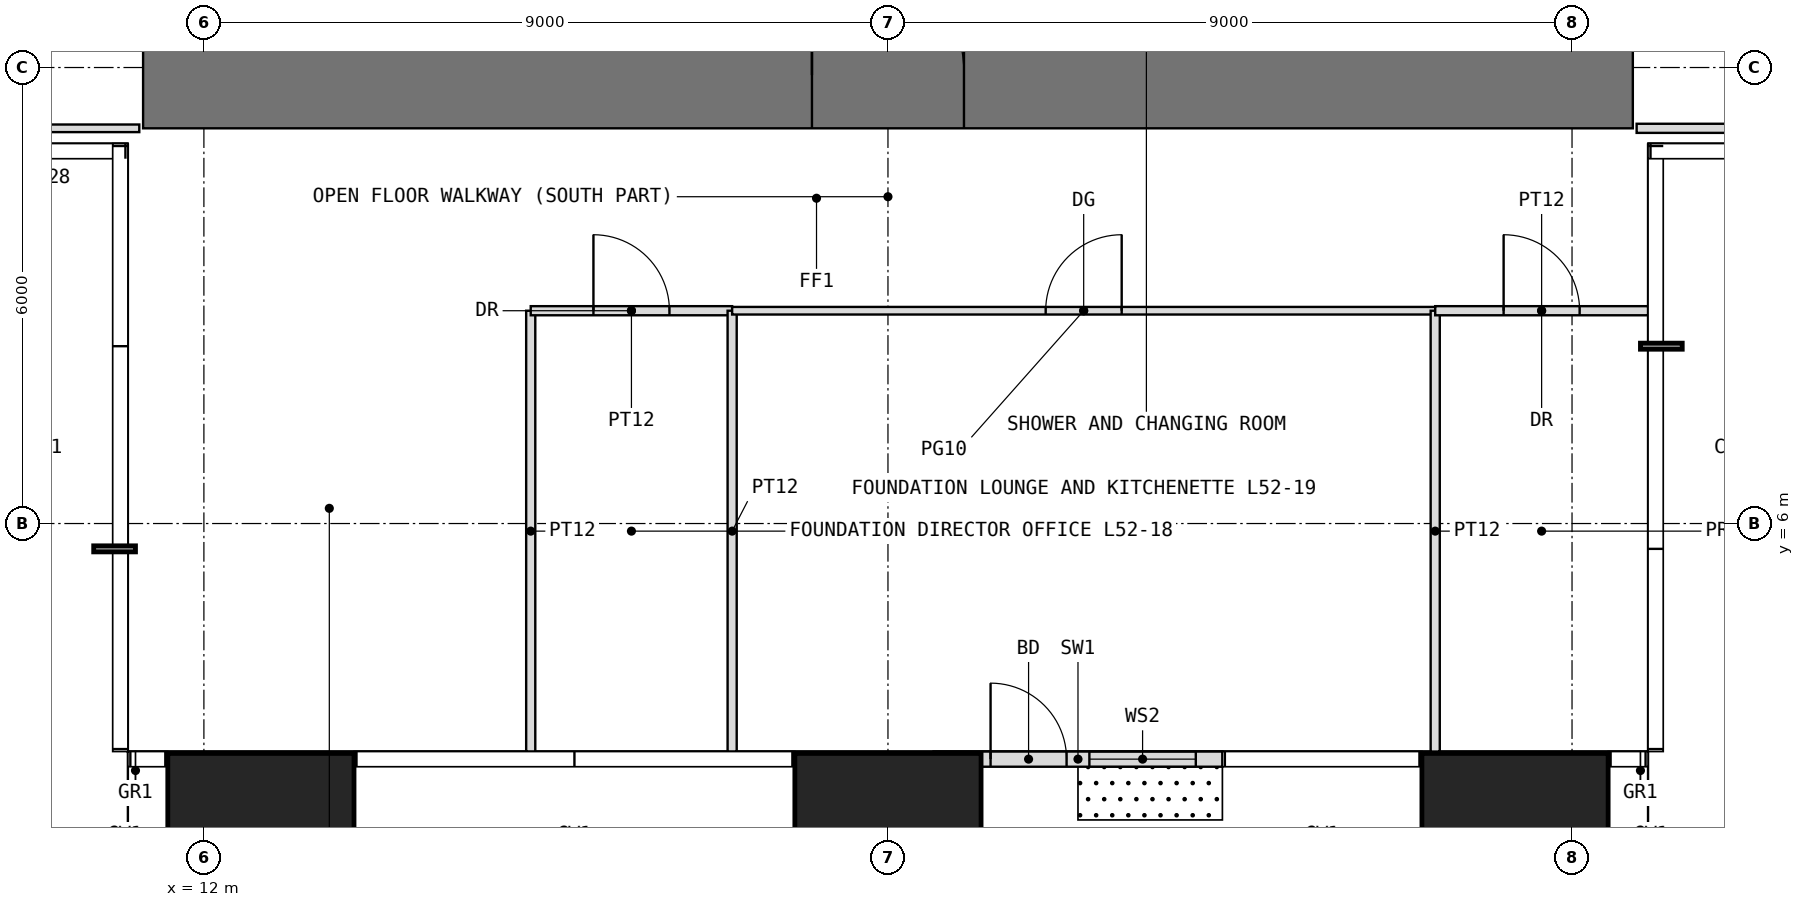
"""IFC4 building model, lengths in metres.
Left out: names, types, materials, properties, quantities, classifications, styles, units other than length and angle.
Written with IfcOpenShell. Run it as: python <this file> out.ifc"""

import sys

from ifc_helpers import new_model, si_unit, direction, frame, frame_2d, origin, origin_2d, place, context, subcontext, project, spatial, rectangle, extrude, element, fill, save


model = new_model("IFC4")
c1 = context("Model", 3, precision=1e-05, world=origin(), true_north=direction((0.0, 1.0)))
c2 = subcontext(c1, "Body", "Model", "MODEL_VIEW")
j1 = project(units=[si_unit("LENGTHUNIT", "METRE"), si_unit("PLANEANGLEUNIT", "RADIAN")], contexts=[c1])
p1 = place(None, origin())
s1 = spatial("IfcSite", under=j1, at=p1, CompositionType="ELEMENT")
p2 = place(p1, origin())
s2 = spatial("IfcBuilding", under=s1, at=p2, CompositionType="ELEMENT")
p3 = place(p2, frame((0.0, 0.0, 218.5)))
s3 = spatial("IfcBuildingStorey", under=s2, at=p3, CompositionType="ELEMENT", Elevation=218.5)
for number, where, z_axis, x_axis in (
    (1, (12.75, 1.75, 0.0), (0.0, 0.0, 1.0), (1.0, 0.0, 0.0)),
    (2, (21.0, 1.75, 0.0), (0.0, 0.0, 1.0), (1.0, 0.0, 0.0)),
    (3, (29.25, 1.75, 0.0), (0.0, 0.0, 1.0), (1.0, 0.0, 0.0)),
):
    element("IfcColumn", number, at=place(p3, frame(where, z_axis=z_axis, x_axis=x_axis)), inside=s3, PredefinedType="COLUMN", context=c2, shape_type="SweptSolid", body=[
        extrude(rectangle(XDim=2.45, YDim=2.45, at=origin_2d()), origin(), (0.0, 0.0, 1.0), 4.0),
    ])
p4 = place(p3, frame((21.6, 2.9, 0.0), z_axis=(0.0, 0.0, 1.0), x_axis=(1.0, 0.0, 0.0)))
e4 = element("IfcWall", 4, at=p4, inside=s3, PredefinedType="USERDEFINED", context=c2, shape_type="SweptSolid", body=[
    extrude(rectangle(XDim=3.8, YDim=0.2, at=frame_2d((1.9, 0.0))), origin(), (0.0, 0.0, 1.0), 3.75),
])
p5 = place(p4, frame((0.75, 0.0, 0.0)))
e5 = element("IfcOpeningElement", 5, at=p5, cuts=e4, PredefinedType="OPENING", context=c2, shape_type="SweptSolid", body=[
    extrude(rectangle(XDim=1.0, YDim=2.4, at=frame_2d((0.5, 1.2))), frame((0.0, 0.11, 0.0), z_axis=(0.0, -1.0, 0.0), x_axis=(1.0, 0.0, 0.0)), (0.0, 0.0, 1.0), 0.22),
])
p6 = place(p4, frame((2.05, 0.0, 0.3)))
e6 = element("IfcOpeningElement", 6, at=p6, cuts=e4, PredefinedType="OPENING", context=c2, shape_type="SweptSolid", body=[
    extrude(rectangle(XDim=1.4, YDim=2.7, at=frame_2d((0.7, 1.35))), frame((0.0, 0.11, 0.0), z_axis=(0.0, -1.0, 0.0), x_axis=(1.0, 0.0, 0.0)), (0.0, 0.0, 1.0), 0.22),
])
p7 = place(p3, frame((11.2, 11.9, -0.05), z_axis=(0.0, 0.0, 1.0), x_axis=(1.0, 0.0, 0.0)))
e7 = element("IfcWall", 7, at=p7, inside=s3, PredefinedType="SHEAR", context=c2, shape_type="SweptSolid", body=[
    extrude(rectangle(XDim=19.6, YDim=1.4, at=frame_2d((9.8, 0.0))), origin(), (0.0, 0.0, 1.0), 4.0),
])
p8 = place(p7, frame((8.8, 0.0, 0.05)))
e8 = element("IfcOpeningElement", 8, at=p8, cuts=e7, PredefinedType="OPENING", context=c2, shape_type="SweptSolid", body=[
    extrude(rectangle(XDim=2.0, YDim=2.2, at=frame_2d((1.0, 1.1))), frame((0.0, 0.71, 0.0), z_axis=(0.0, -1.0, 0.0), x_axis=(1.0, 0.0, 0.0)), (0.0, 0.0, 1.0), 1.42),
])
p9 = place(p3, frame((7.6, 11.2, 0.0), z_axis=(0.0, 0.0, 1.0), x_axis=(1.0, 0.0, 0.0)))
e9 = element("IfcWall", 9, at=p9, inside=s3, PredefinedType="PARTITIONING", context=c2, shape_type="SweptSolid", body=[
    extrude(rectangle(XDim=3.55, YDim=0.1, at=frame_2d((1.775, 0.0))), origin(), (0.0, 0.0, 1.0), 3.75),
])
p10 = place(p3, frame((16.3, 3.0, 0.0), z_axis=(0.0, 0.0, 1.0), x_axis=(0.0, 1.0, 0.0)))
e10 = element("IfcWall", 10, at=p10, inside=s3, PredefinedType="PARTITIONING", context=c2, shape_type="SweptSolid", body=[
    extrude(rectangle(XDim=5.8, YDim=0.12, at=frame_2d((2.9, 0.0))), origin(), (0.0, 0.0, 1.0), 3.75),
])
p11 = place(p3, frame((16.3, 8.8, 0.0), z_axis=(0.0, 0.0, 1.0), x_axis=(1.0, 0.0, 0.0)))
e11 = element("IfcWall", 11, at=p11, inside=s3, PredefinedType="PARTITIONING", context=c2, shape_type="SweptSolid", body=[
    extrude(rectangle(XDim=2.65, YDim=0.12, at=frame_2d((1.325, 0.0))), origin(), (0.0, 0.0, 1.0), 3.75),
])
p12 = place(p11, frame((0.825, 0.0, 0.0)))
e12 = element("IfcOpeningElement", 12, at=p12, cuts=e11, PredefinedType="OPENING", context=c2, shape_type="SweptSolid", body=[
    extrude(rectangle(XDim=1.0, YDim=2.2, at=frame_2d((0.5, 1.1))), frame((0.0, 0.07, 0.0), z_axis=(0.0, -1.0, 0.0), x_axis=(1.0, 0.0, 0.0)), (0.0, 0.0, 1.0), 0.14),
])
p13 = place(p3, frame((18.95, 3.0, 0.0), z_axis=(0.0, 0.0, 1.0), x_axis=(0.0, 1.0, 0.0)))
e13 = element("IfcWall", 13, at=p13, inside=s3, PredefinedType="PARTITIONING", context=c2, shape_type="SweptSolid", body=[
    extrude(rectangle(XDim=5.8, YDim=0.12, at=frame_2d((2.9, 0.0))), origin(), (0.0, 0.0, 1.0), 3.75),
])
p14 = place(p3, frame((18.95, 8.8, 0.0), z_axis=(0.0, 0.0, 1.0), x_axis=(1.0, 0.0, 0.0)))
e14 = element("IfcWall", 14, at=p14, inside=s3, PredefinedType="PARTITIONING", context=c2, shape_type="SweptSolid", body=[
    extrude(rectangle(XDim=9.25, YDim=0.1, at=frame_2d((4.625, 0.0))), origin(), (0.0, 0.0, 1.0), 3.75),
])
p15 = place(p14, frame((4.125, 0.0, 0.0)))
e15 = element("IfcOpeningElement", 15, at=p15, cuts=e14, PredefinedType="OPENING", context=c2, shape_type="SweptSolid", body=[
    extrude(rectangle(XDim=1.0, YDim=2.4, at=frame_2d((0.5, 1.2))), frame((0.0, 0.06, 0.0), z_axis=(0.0, -1.0, 0.0), x_axis=(1.0, 0.0, 0.0)), (0.0, 0.0, 1.0), 0.12),
])
p16 = place(p3, frame((28.2, 3.0, 0.0), z_axis=(0.0, 0.0, 1.0), x_axis=(0.0, 1.0, 0.0)))
e16 = element("IfcWall", 16, at=p16, inside=s3, PredefinedType="PARTITIONING", context=c2, shape_type="SweptSolid", body=[
    extrude(rectangle(XDim=5.8, YDim=0.12, at=frame_2d((2.9, 0.0))), origin(), (0.0, 0.0, 1.0), 3.75),
])
p17 = place(p3, frame((28.2, 8.8, 0.0), z_axis=(0.0, 0.0, 1.0), x_axis=(1.0, 0.0, 0.0)))
e17 = element("IfcWall", 17, at=p17, inside=s3, PredefinedType="PARTITIONING", context=c2, shape_type="SweptSolid", body=[
    extrude(rectangle(XDim=2.8, YDim=0.12, at=frame_2d((1.4, 0.0))), origin(), (0.0, 0.0, 1.0), 3.75),
])
p18 = place(p17, frame((0.9, 0.0, 0.0)))
e18 = element("IfcOpeningElement", 18, at=p18, cuts=e17, PredefinedType="OPENING", context=c2, shape_type="SweptSolid", body=[
    extrude(rectangle(XDim=1.0, YDim=2.2, at=frame_2d((0.5, 1.1))), frame((0.0, 0.07, 0.0), z_axis=(0.0, -1.0, 0.0), x_axis=(1.0, 0.0, 0.0)), (0.0, 0.0, 1.0), 0.14),
])
p19 = place(p3, frame((30.85, 11.2, 0.0), z_axis=(0.0, 0.0, 1.0), x_axis=(1.0, 0.0, 0.0)))
e19 = element("IfcWall", 19, at=p19, inside=s3, PredefinedType="PARTITIONING", context=c2, shape_type="SweptSolid", body=[
    extrude(rectangle(XDim=4.45, YDim=0.12, at=frame_2d((2.225, 0.0))), origin(), (0.0, 0.0, 1.0), 3.75),
])
p20 = place(p5, origin())
e20 = element("IfcDoor", 20, at=p20, inside=s3, OperationType="SINGLE_SWING_LEFT", PredefinedType="DOOR", context=c2, shape_type="SweptSolid", body=[
    extrude(rectangle(XDim=1.0, YDim=2.4, at=frame_2d((0.5, 1.2))), frame((0.0, 0.025, 0.0), z_axis=(0.0, -1.0, 0.0), x_axis=(1.0, 0.0, 0.0)), (0.0, 0.0, 1.0), 0.05),
])
fill(e5, e20)
p21 = place(p6, origin())
e21 = element("IfcWindow", 21, at=p21, inside=s3, PartitioningType="SINGLE_PANEL", PredefinedType="WINDOW", context=c2, shape_type="SweptSolid", body=[
    extrude(rectangle(XDim=1.4, YDim=2.7, at=frame_2d((0.7, 1.35))), frame((0.0, 0.03, 0.0), z_axis=(0.0, -1.0, 0.0), x_axis=(1.0, 0.0, 0.0)), (0.0, 0.0, 1.0), 0.06),
])
fill(e6, e21)
p22 = place(p8, origin())
e22 = element("IfcDoor", 22, at=p22, inside=s3, OperationType="DOUBLE_DOOR_SINGLE_SWING", PredefinedType="DOOR", context=c2, shape_type="SweptSolid", body=[
    extrude(rectangle(XDim=2.0, YDim=2.2, at=frame_2d((1.0, 1.1))), frame((0.0, 0.025, 0.0), z_axis=(0.0, -1.0, 0.0), x_axis=(1.0, 0.0, 0.0)), (0.0, 0.0, 1.0), 0.05),
])
fill(e8, e22)
p23 = place(p12, origin())
e23 = element("IfcDoor", 23, at=p23, inside=s3, OperationType="SINGLE_SWING_LEFT", PredefinedType="DOOR", context=c2, shape_type="SweptSolid", body=[
    extrude(rectangle(XDim=1.0, YDim=2.2, at=frame_2d((0.5, 1.1))), frame((0.0, 0.025, 0.0), z_axis=(0.0, -1.0, 0.0), x_axis=(1.0, 0.0, 0.0)), (0.0, 0.0, 1.0), 0.05),
])
fill(e12, e23)
p24 = place(p15, origin())
e24 = element("IfcDoor", 24, at=p24, inside=s3, OperationType="SINGLE_SWING_RIGHT", PredefinedType="DOOR", context=c2, shape_type="SweptSolid", body=[
    extrude(rectangle(XDim=1.0, YDim=2.4, at=frame_2d((0.5, 1.2))), frame((0.0, 0.025, 0.0), z_axis=(0.0, -1.0, 0.0), x_axis=(1.0, 0.0, 0.0)), (0.0, 0.0, 1.0), 0.05),
])
fill(e15, e24)
p25 = place(p18, origin())
e25 = element("IfcDoor", 25, at=p25, inside=s3, OperationType="SINGLE_SWING_LEFT", PredefinedType="DOOR", context=c2, shape_type="SweptSolid", body=[
    extrude(rectangle(XDim=1.0, YDim=2.2, at=frame_2d((0.5, 1.1))), frame((0.0, 0.025, 0.0), z_axis=(0.0, -1.0, 0.0), x_axis=(1.0, 0.0, 0.0)), (0.0, 0.0, 1.0), 0.05),
])
fill(e18, e25)
save(model, sys.argv[1])
